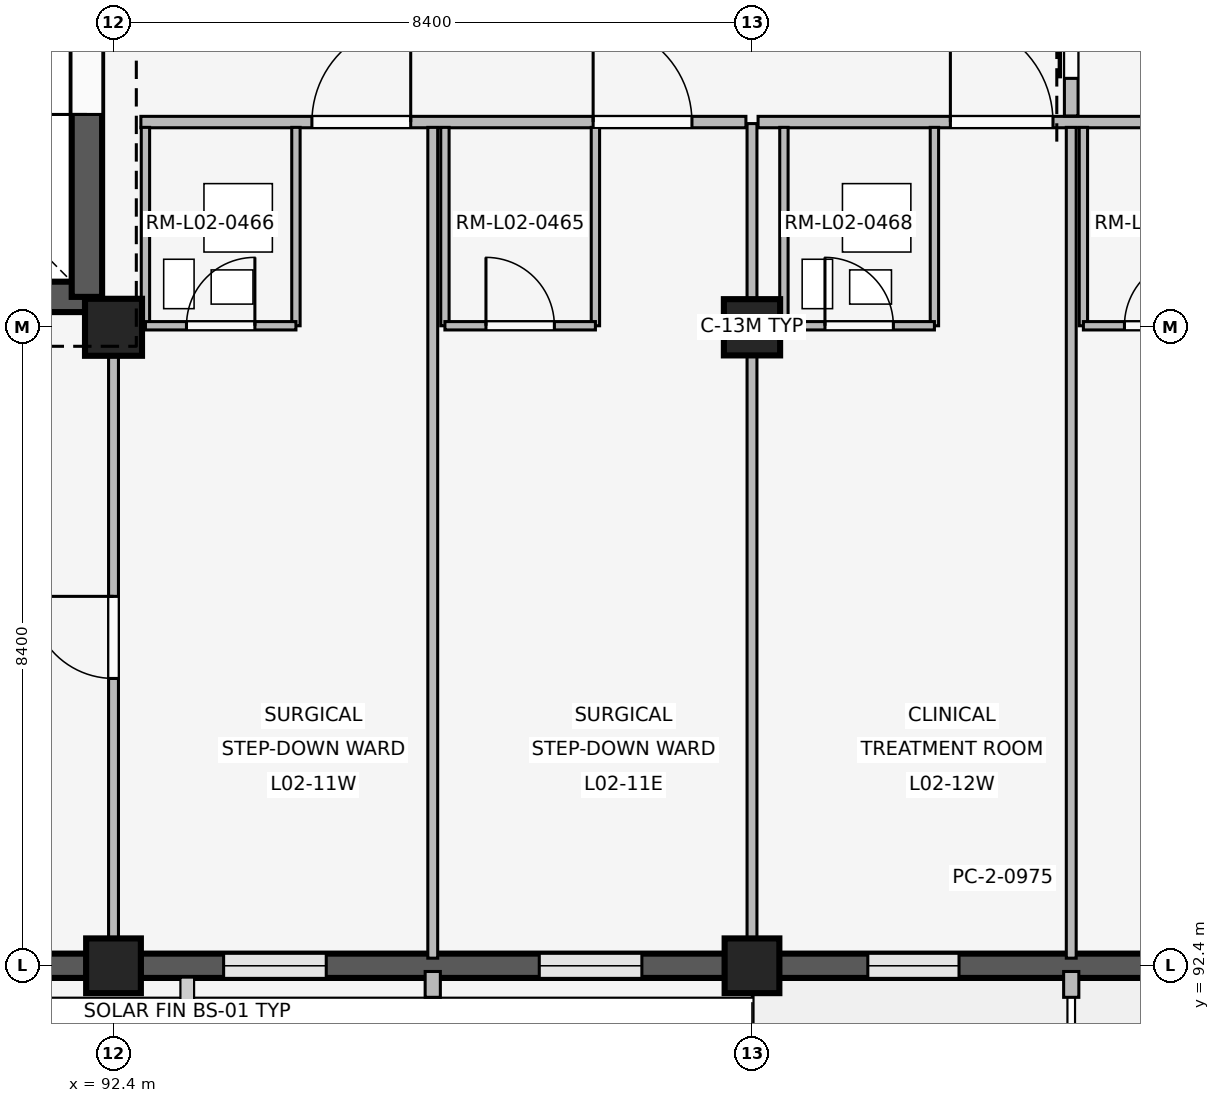
"""IFC4 building model, lengths in metres.
Left out: names, types, materials, properties, quantities, classifications, styles, units other than length and angle.
Written with IfcOpenShell. Run it as: python <this file> out.ifc"""

import sys

from ifc_helpers import new_model, si_unit, direction, frame, frame_2d, origin, origin_2d, place, context, subcontext, project, spatial, rectangle, extrude, element, fill, save


model = new_model("IFC4")
c1 = context("Model", 3, precision=1e-05, world=origin(), true_north=direction((0.0, 1.0)))
c2 = subcontext(c1, "Body", "Model", "MODEL_VIEW")
j1 = project(units=[si_unit("LENGTHUNIT", "METRE"), si_unit("PLANEANGLEUNIT", "RADIAN")], contexts=[c1])
p1 = place(None, origin())
s1 = spatial("IfcSite", under=j1, at=p1, CompositionType="ELEMENT")
p2 = place(p1, origin())
s2 = spatial("IfcBuilding", under=s1, at=p2, CompositionType="ELEMENT")
p3 = place(p2, frame((0.0, 0.0, 8.1)))
s3 = spatial("IfcBuildingStorey", under=s2, at=p3, CompositionType="ELEMENT", Elevation=8.1)
p4 = place(p3, frame((92.4, 92.4, 0.0), z_axis=(0.0, 0.0, 1.0), x_axis=(1.0, 0.0, 0.0)))
e1 = element("IfcColumn", 1, at=p4, inside=s3, PredefinedType="COLUMN", context=c2, shape_type="SweptSolid", body=[
    extrude(rectangle(XDim=0.72, YDim=0.72, at=origin_2d()), origin(), (0.0, 0.0, 1.0), 4.8),
])
p5 = place(p3, frame((92.4, 100.8, 0.0), z_axis=(0.0, 0.0, 1.0), x_axis=(1.0, 0.0, 0.0)))
e2 = element("IfcColumn", 2, at=p5, inside=s3, PredefinedType="COLUMN", context=c2, shape_type="SweptSolid", body=[
    extrude(rectangle(XDim=0.75, YDim=0.75, at=origin_2d()), origin(), (0.0, 0.0, 1.0), 4.8),
])
p6 = place(p3, frame((100.8, 92.4, 0.0), z_axis=(0.0, 0.0, 1.0), x_axis=(1.0, 0.0, 0.0)))
e3 = element("IfcColumn", 3, at=p6, inside=s3, PredefinedType="COLUMN", context=c2, shape_type="SweptSolid", body=[
    extrude(rectangle(XDim=0.72, YDim=0.72, at=origin_2d()), origin(), (0.0, 0.0, 1.0), 4.8),
])
p7 = place(p3, frame((100.8, 100.8, 0.0), z_axis=(0.0, 0.0, 1.0), x_axis=(1.0, 0.0, 0.0)))
e4 = element("IfcColumn", 4, at=p7, inside=s3, PredefinedType="COLUMN", context=c2, shape_type="SweptSolid", body=[
    extrude(rectangle(XDim=0.74, YDim=0.74, at=origin_2d()), origin(), (0.0, 0.0, 1.0), 4.8),
])
p8 = place(p3, frame((92.045, 92.4, 0.0), z_axis=(0.0, 0.0, 1.0), x_axis=(-1.0, 0.0, 0.0)))
e5 = element("IfcWall", 5, at=p8, inside=s3, PredefinedType="SOLIDWALL", context=c2, shape_type="SweptSolid", body=[
    extrude(rectangle(XDim=7.69, YDim=0.32, at=frame_2d((3.845, 0.0))), origin(), (0.0, 0.0, 1.0), 3.86),
])
p9 = place(p8, frame((1.009, 0.0, 0.85)))
e6 = element("IfcOpeningElement", 6, at=p9, cuts=e5, PredefinedType="OPENING", context=c2, shape_type="SweptSolid", body=[
    extrude(rectangle(XDim=1.52, YDim=1.65, at=frame_2d((0.76, 0.825))), frame((0.0, 0.17, 0.0), z_axis=(0.0, -1.0, 0.0), x_axis=(1.0, 0.0, 0.0)), (0.0, 0.0, 1.0), 0.34),
])
p10 = place(p8, frame((5.161, 0.0, 0.85)))
e7 = element("IfcOpeningElement", 7, at=p10, cuts=e5, PredefinedType="OPENING", context=c2, shape_type="SweptSolid", body=[
    extrude(rectangle(XDim=1.52, YDim=1.65, at=frame_2d((0.76, 0.825))), frame((0.0, 0.17, 0.0), z_axis=(0.0, -1.0, 0.0), x_axis=(1.0, 0.0, 0.0)), (0.0, 0.0, 1.0), 0.34),
])
p11 = place(p3, frame((100.445, 92.4, 0.0), z_axis=(0.0, 0.0, 1.0), x_axis=(-1.0, 0.0, 0.0)))
e8 = element("IfcWall", 8, at=p11, inside=s3, PredefinedType="SOLIDWALL", context=c2, shape_type="SweptSolid", body=[
    extrude(rectangle(XDim=7.69, YDim=0.32, at=frame_2d((3.845, 0.0))), origin(), (0.0, 0.0, 1.0), 3.86),
])
p12 = place(p11, frame((1.094, 0.0, 0.85)))
e9 = element("IfcOpeningElement", 9, at=p12, cuts=e8, PredefinedType="OPENING", context=c2, shape_type="SweptSolid", body=[
    extrude(rectangle(XDim=1.35, YDim=1.55, at=frame_2d((0.675, 0.775))), frame((0.0, 0.17, 0.0), z_axis=(0.0, -1.0, 0.0), x_axis=(1.0, 0.0, 0.0)), (0.0, 0.0, 1.0), 0.34),
])
p13 = place(p11, frame((5.246, 0.0, 0.85)))
e10 = element("IfcOpeningElement", 10, at=p13, cuts=e8, PredefinedType="OPENING", context=c2, shape_type="SweptSolid", body=[
    extrude(rectangle(XDim=1.35, YDim=1.55, at=frame_2d((0.675, 0.775))), frame((0.0, 0.17, 0.0), z_axis=(0.0, -1.0, 0.0), x_axis=(1.0, 0.0, 0.0)), (0.0, 0.0, 1.0), 0.34),
])
p14 = place(p3, frame((96.6, 92.325, 0.0), z_axis=(0.0, 0.0, 1.0), x_axis=(0.0, -1.0, 0.0)))
e11 = element("IfcWall", 11, at=p14, inside=s3, PredefinedType="ELEMENTEDWALL", context=c2, shape_type="SweptSolid", body=[
    extrude(rectangle(XDim=0.34, YDim=0.2, at=frame_2d((0.17, 0.0))), origin(), (0.0, 0.0, 1.0), 3.84),
])
p15 = place(p3, frame((108.845, 92.4, 0.0), z_axis=(0.0, 0.0, 1.0), x_axis=(-1.0, 0.0, 0.0)))
e12 = element("IfcWall", 12, at=p15, inside=s3, PredefinedType="SOLIDWALL", context=c2, shape_type="SweptSolid", body=[
    extrude(rectangle(XDim=7.69, YDim=0.32, at=frame_2d((3.845, 0.0))), origin(), (0.0, 0.0, 1.0), 3.86),
])
p16 = place(p15, frame((1.169, 0.0, 0.85)))
e13 = element("IfcOpeningElement", 13, at=p16, cuts=e12, PredefinedType="OPENING", context=c2, shape_type="SweptSolid", body=[
    extrude(rectangle(XDim=1.2, YDim=1.55, at=frame_2d((0.6, 0.775))), frame((0.0, 0.17, 0.0), z_axis=(0.0, -1.0, 0.0), x_axis=(1.0, 0.0, 0.0)), (0.0, 0.0, 1.0), 0.34),
])
p17 = place(p15, frame((5.321, 0.0, 0.85)))
e14 = element("IfcOpeningElement", 14, at=p17, cuts=e12, PredefinedType="OPENING", context=c2, shape_type="SweptSolid", body=[
    extrude(rectangle(XDim=1.2, YDim=1.55, at=frame_2d((0.6, 0.775))), frame((0.0, 0.17, 0.0), z_axis=(0.0, -1.0, 0.0), x_axis=(1.0, 0.0, 0.0)), (0.0, 0.0, 1.0), 0.34),
])
p18 = place(p3, frame((105.0, 92.325, 0.0), z_axis=(0.0, 0.0, 1.0), x_axis=(0.0, -1.0, 0.0)))
e15 = element("IfcWall", 15, at=p18, inside=s3, PredefinedType="ELEMENTEDWALL", context=c2, shape_type="SweptSolid", body=[
    extrude(rectangle(XDim=0.34, YDim=0.2, at=frame_2d((0.17, 0.0))), origin(), (0.0, 0.0, 1.0), 3.84),
])
p19 = place(p3, frame((84.55, 101.2, 0.0), z_axis=(0.0, 0.0, 1.0), x_axis=(1.0, 0.0, 0.0)))
e16 = element("IfcWall", 16, at=p19, inside=s3, PredefinedType="SHEAR", context=c2, shape_type="SweptSolid", body=[
    extrude(rectangle(XDim=7.5, YDim=0.4, at=frame_2d((3.75, 0.0))), origin(), (0.0, 0.0, 1.0), 4.52),
])
p20 = place(p19, frame((4.85, 0.0, 0.0)))
e17 = element("IfcOpeningElement", 17, at=p20, cuts=e16, PredefinedType="OPENING", context=c2, shape_type="SweptSolid", body=[
    extrude(rectangle(XDim=1.2, YDim=2.2, at=frame_2d((0.6, 1.1))), frame((0.0, 0.21, 0.0), z_axis=(0.0, -1.0, 0.0), x_axis=(1.0, 0.0, 0.0)), (0.0, 0.0, 1.0), 0.42),
])
p21 = place(p3, frame((92.05, 101.2, 0.0), z_axis=(0.0, 0.0, 1.0), x_axis=(0.0, 1.0, 0.0)))
e18 = element("IfcWall", 18, at=p21, inside=s3, PredefinedType="SHEAR", context=c2, shape_type="SweptSolid", body=[
    extrude(rectangle(XDim=7.55, YDim=0.4, at=frame_2d((3.775, 0.0))), origin(), (0.0, 0.0, 1.0), 4.52),
])
p22 = place(p21, frame((2.4, 0.0, 0.0)))
e19 = element("IfcOpeningElement", 19, at=p22, cuts=e18, PredefinedType="OPENING", context=c2, shape_type="SweptSolid", body=[
    extrude(rectangle(XDim=1.2, YDim=2.2, at=frame_2d((0.6, 1.1))), frame((0.0, 0.21, 0.0), z_axis=(0.0, -1.0, 0.0), x_axis=(1.0, 0.0, 0.0)), (0.0, 0.0, 1.0), 0.42),
])
p23 = place(p3, frame((92.4, 92.54, 0.0), z_axis=(0.0, 0.0, 1.0), x_axis=(0.0, 1.0, 0.0)))
e20 = element("IfcWall", 20, at=p23, inside=s3, PredefinedType="PARTITIONING", context=c2, shape_type="SweptSolid", body=[
    extrude(rectangle(XDim=8.21, YDim=0.13, at=frame_2d((4.105, 0.0))), origin(), (0.0, 0.0, 1.0), 3.84),
])
p24 = place(p23, frame((3.64, 0.0, 0.0)))
e21 = element("IfcOpeningElement", 21, at=p24, cuts=e20, PredefinedType="OPENING", context=c2, shape_type="SweptSolid", body=[
    extrude(rectangle(XDim=1.08, YDim=2.15, at=frame_2d((0.54, 1.075))), frame((0.0, 0.075, 0.0), z_axis=(0.0, -1.0, 0.0), x_axis=(1.0, 0.0, 0.0)), (0.0, 0.0, 1.0), 0.15),
])
p25 = place(p3, frame((92.76, 103.5, 0.0), z_axis=(0.0, 0.0, 1.0), x_axis=(1.0, 0.0, 0.0)))
e22 = element("IfcWall", 22, at=p25, inside=s3, PredefinedType="PARTITIONING", context=c2, shape_type="SweptSolid", body=[
    extrude(rectangle(XDim=7.96, YDim=0.15, at=frame_2d((3.98, 0.0))), origin(), (0.0, 0.0, 1.0), 3.84),
])
p26 = place(p25, frame((2.25, 0.0, 0.0)))
e23 = element("IfcOpeningElement", 23, at=p26, cuts=e22, PredefinedType="OPENING", context=c2, shape_type="SweptSolid", body=[
    extrude(rectangle(XDim=1.3, YDim=2.25, at=frame_2d((0.65, 1.125))), frame((0.0, 0.085, 0.0), z_axis=(0.0, -1.0, 0.0), x_axis=(1.0, 0.0, 0.0)), (0.0, 0.0, 1.0), 0.17),
])
p27 = place(p25, frame((5.95, 0.0, 0.0)))
e24 = element("IfcOpeningElement", 24, at=p27, cuts=e22, PredefinedType="OPENING", context=c2, shape_type="SweptSolid", body=[
    extrude(rectangle(XDim=1.3, YDim=2.25, at=frame_2d((0.65, 1.125))), frame((0.0, 0.085, 0.0), z_axis=(0.0, -1.0, 0.0), x_axis=(1.0, 0.0, 0.0)), (0.0, 0.0, 1.0), 0.17),
])
p28 = place(p3, frame((96.6, 92.5, 0.0), z_axis=(0.0, 0.0, 1.0), x_axis=(0.0, 1.0, 0.0)))
e25 = element("IfcWall", 25, at=p28, inside=s3, PredefinedType="PARTITIONING", context=c2, shape_type="SweptSolid", body=[
    extrude(rectangle(XDim=10.93, YDim=0.13, at=frame_2d((5.465, 0.0))), origin(), (0.0, 0.0, 1.0), 3.84),
])
for number, where, z_axis, x_axis in (
    (26, (92.82, 100.82, 0.0), (0.0, 0.0, 1.0), (0.0, 1.0, 0.0)),
    (27, (94.8, 100.82, 0.0), (0.0, 0.0, 1.0), (0.0, 1.0, 0.0)),
):
    element("IfcWall", number, at=place(p3, frame(where, z_axis=z_axis, x_axis=x_axis)), inside=s3, PredefinedType="PARTITIONING", context=c2, shape_type="SweptSolid", body=[
        extrude(rectangle(XDim=2.61, YDim=0.11, at=frame_2d((1.305, 0.0))), origin(), (0.0, 0.0, 1.0), 3.84),
    ])
p29 = place(p3, frame((92.82, 100.82, 0.0), z_axis=(0.0, 0.0, 1.0), x_axis=(1.0, 0.0, 0.0)))
e28 = element("IfcWall", 28, at=p29, inside=s3, PredefinedType="PARTITIONING", context=c2, shape_type="SweptSolid", body=[
    extrude(rectangle(XDim=1.98, YDim=0.11, at=frame_2d((0.99, 0.0))), origin(), (0.0, 0.0, 1.0), 3.84),
])
p30 = place(p29, frame((0.54, 0.0, 0.0)))
e29 = element("IfcOpeningElement", 29, at=p30, cuts=e28, PredefinedType="OPENING", context=c2, shape_type="SweptSolid", body=[
    extrude(rectangle(XDim=0.9, YDim=2.1, at=frame_2d((0.45, 1.05))), frame((0.0, 0.065, 0.0), z_axis=(0.0, -1.0, 0.0), x_axis=(1.0, 0.0, 0.0)), (0.0, 0.0, 1.0), 0.13),
])
for number, where, z_axis, x_axis in (
    (30, (96.76, 100.82, 0.0), (0.0, 0.0, 1.0), (0.0, 1.0, 0.0)),
    (31, (98.74, 100.82, 0.0), (0.0, 0.0, 1.0), (0.0, 1.0, 0.0)),
):
    element("IfcWall", number, at=place(p3, frame(where, z_axis=z_axis, x_axis=x_axis)), inside=s3, PredefinedType="PARTITIONING", context=c2, shape_type="SweptSolid", body=[
        extrude(rectangle(XDim=2.61, YDim=0.11, at=frame_2d((1.305, 0.0))), origin(), (0.0, 0.0, 1.0), 3.84),
    ])
p31 = place(p3, frame((96.76, 100.82, 0.0), z_axis=(0.0, 0.0, 1.0), x_axis=(1.0, 0.0, 0.0)))
e32 = element("IfcWall", 32, at=p31, inside=s3, PredefinedType="PARTITIONING", context=c2, shape_type="SweptSolid", body=[
    extrude(rectangle(XDim=1.98, YDim=0.11, at=frame_2d((0.99, 0.0))), origin(), (0.0, 0.0, 1.0), 3.84),
])
p32 = place(p31, frame((0.54, 0.0, 0.0)))
e33 = element("IfcOpeningElement", 33, at=p32, cuts=e32, PredefinedType="OPENING", context=c2, shape_type="SweptSolid", body=[
    extrude(rectangle(XDim=0.9, YDim=2.1, at=frame_2d((0.45, 1.05))), frame((0.0, 0.065, 0.0), z_axis=(0.0, -1.0, 0.0), x_axis=(1.0, 0.0, 0.0)), (0.0, 0.0, 1.0), 0.13),
])
p33 = place(p3, frame((100.8, 92.54, 0.0), z_axis=(0.0, 0.0, 1.0), x_axis=(0.0, 1.0, 0.0)))
e34 = element("IfcWall", 34, at=p33, inside=s3, PredefinedType="PARTITIONING", context=c2, shape_type="SweptSolid", body=[
    extrude(rectangle(XDim=10.94, YDim=0.13, at=frame_2d((5.47, 0.0))), origin(), (0.0, 0.0, 1.0), 3.84),
])
p34 = place(p3, frame((100.88, 103.5, 0.0), z_axis=(0.0, 0.0, 1.0), x_axis=(1.0, 0.0, 0.0)))
e35 = element("IfcWall", 35, at=p34, inside=s3, PredefinedType="PARTITIONING", context=c2, shape_type="SweptSolid", body=[
    extrude(rectangle(XDim=8.24, YDim=0.15, at=frame_2d((4.12, 0.0))), origin(), (0.0, 0.0, 1.0), 3.84),
])
p35 = place(p34, frame((2.53, 0.0, 0.0)))
e36 = element("IfcOpeningElement", 36, at=p35, cuts=e35, PredefinedType="OPENING", context=c2, shape_type="SweptSolid", body=[
    extrude(rectangle(XDim=1.35, YDim=2.25, at=frame_2d((0.675, 1.125))), frame((0.0, 0.085, 0.0), z_axis=(0.0, -1.0, 0.0), x_axis=(1.0, 0.0, 0.0)), (0.0, 0.0, 1.0), 0.17),
])
p36 = place(p34, frame((6.23, 0.0, 0.0)))
e37 = element("IfcOpeningElement", 37, at=p36, cuts=e35, PredefinedType="OPENING", context=c2, shape_type="SweptSolid", body=[
    extrude(rectangle(XDim=1.35, YDim=2.25, at=frame_2d((0.675, 1.125))), frame((0.0, 0.085, 0.0), z_axis=(0.0, -1.0, 0.0), x_axis=(1.0, 0.0, 0.0)), (0.0, 0.0, 1.0), 0.17),
])
p37 = place(p3, frame((105.0, 92.5, 0.0), z_axis=(0.0, 0.0, 1.0), x_axis=(0.0, 1.0, 0.0)))
e38 = element("IfcWall", 38, at=p37, inside=s3, PredefinedType="PARTITIONING", context=c2, shape_type="SweptSolid", body=[
    extrude(rectangle(XDim=10.93, YDim=0.13, at=frame_2d((5.465, 0.0))), origin(), (0.0, 0.0, 1.0), 3.84),
])
for number, where, z_axis, x_axis in (
    (39, (101.22, 100.82, 0.0), (0.0, 0.0, 1.0), (0.0, 1.0, 0.0)),
    (40, (103.2, 100.82, 0.0), (0.0, 0.0, 1.0), (0.0, 1.0, 0.0)),
):
    element("IfcWall", number, at=place(p3, frame(where, z_axis=z_axis, x_axis=x_axis)), inside=s3, PredefinedType="PARTITIONING", context=c2, shape_type="SweptSolid", body=[
        extrude(rectangle(XDim=2.61, YDim=0.11, at=frame_2d((1.305, 0.0))), origin(), (0.0, 0.0, 1.0), 3.84),
    ])
p38 = place(p3, frame((101.22, 100.82, 0.0), z_axis=(0.0, 0.0, 1.0), x_axis=(1.0, 0.0, 0.0)))
e41 = element("IfcWall", 41, at=p38, inside=s3, PredefinedType="PARTITIONING", context=c2, shape_type="SweptSolid", body=[
    extrude(rectangle(XDim=1.98, YDim=0.11, at=frame_2d((0.99, 0.0))), origin(), (0.0, 0.0, 1.0), 3.84),
])
p39 = place(p38, frame((0.54, 0.0, 0.0)))
e42 = element("IfcOpeningElement", 42, at=p39, cuts=e41, PredefinedType="OPENING", context=c2, shape_type="SweptSolid", body=[
    extrude(rectangle(XDim=0.9, YDim=2.1, at=frame_2d((0.45, 1.05))), frame((0.0, 0.065, 0.0), z_axis=(0.0, -1.0, 0.0), x_axis=(1.0, 0.0, 0.0)), (0.0, 0.0, 1.0), 0.13),
])
p40 = place(p3, frame((105.16, 100.82, 0.0), z_axis=(0.0, 0.0, 1.0), x_axis=(0.0, 1.0, 0.0)))
e43 = element("IfcWall", 43, at=p40, inside=s3, PredefinedType="PARTITIONING", context=c2, shape_type="SweptSolid", body=[
    extrude(rectangle(XDim=2.61, YDim=0.11, at=frame_2d((1.305, 0.0))), origin(), (0.0, 0.0, 1.0), 3.84),
])
p41 = place(p3, frame((105.16, 100.82, 0.0), z_axis=(0.0, 0.0, 1.0), x_axis=(1.0, 0.0, 0.0)))
e44 = element("IfcWall", 44, at=p41, inside=s3, PredefinedType="PARTITIONING", context=c2, shape_type="SweptSolid", body=[
    extrude(rectangle(XDim=1.98, YDim=0.11, at=frame_2d((0.99, 0.0))), origin(), (0.0, 0.0, 1.0), 3.84),
])
p42 = place(p41, frame((0.54, 0.0, 0.0)))
e45 = element("IfcOpeningElement", 45, at=p42, cuts=e44, PredefinedType="OPENING", context=c2, shape_type="SweptSolid", body=[
    extrude(rectangle(XDim=0.9, YDim=2.1, at=frame_2d((0.45, 1.05))), frame((0.0, 0.065, 0.0), z_axis=(0.0, -1.0, 0.0), x_axis=(1.0, 0.0, 0.0)), (0.0, 0.0, 1.0), 0.13),
])
p43 = place(p3, frame((103.65, 93.55, 0.0), z_axis=(0.0, 0.0, 1.0), x_axis=(1.0, 0.0, 0.0)))
e46 = element("IfcWall", 46, at=p43, inside=s3, PredefinedType="PLUMBINGWALL", context=c2, shape_type="SweptSolid", body=[
    extrude(rectangle(XDim=0.9, YDim=0.24, at=frame_2d((0.45, 0.0))), origin(), (0.0, 0.0, 1.0), 3.84),
])
p44 = place(p3, frame((105.0, 103.58, 0.0), z_axis=(0.0, 0.0, 1.0), x_axis=(0.0, 1.0, 0.0)))
e47 = element("IfcWall", 47, at=p44, inside=s3, PredefinedType="PARTITIONING", context=c2, shape_type="SweptSolid", body=[
    extrude(rectangle(XDim=2.84, YDim=0.18, at=frame_2d((1.42, 0.0))), origin(), (0.0, 0.0, 1.0), 3.84),
])
p45 = place(p44, frame((0.495, 0.0, 0.0)))
e48 = element("IfcOpeningElement", 48, at=p45, cuts=e47, PredefinedType="OPENING", context=c2, shape_type="SweptSolid", body=[
    extrude(rectangle(XDim=1.85, YDim=2.3, at=frame_2d((0.925, 1.15))), frame((0.0, 0.1, 0.0), z_axis=(0.0, -1.0, 0.0), x_axis=(1.0, 0.0, 0.0)), (0.0, 0.0, 1.0), 0.2),
])
p46 = place(p12, origin())
e49 = element("IfcWindow", 49, at=p46, inside=s3, PartitioningType="SINGLE_PANEL", PredefinedType="WINDOW", context=c2, shape_type="SweptSolid", body=[
    extrude(rectangle(XDim=1.35, YDim=1.55, at=frame_2d((0.675, 0.775))), frame((0.0, 0.03, 0.0), z_axis=(0.0, -1.0, 0.0), x_axis=(1.0, 0.0, 0.0)), (0.0, 0.0, 1.0), 0.06),
])
fill(e9, e49)
p47 = place(p13, origin())
e50 = element("IfcWindow", 50, at=p47, inside=s3, PartitioningType="SINGLE_PANEL", PredefinedType="WINDOW", context=c2, shape_type="SweptSolid", body=[
    extrude(rectangle(XDim=1.35, YDim=1.55, at=frame_2d((0.675, 0.775))), frame((0.0, 0.03, 0.0), z_axis=(0.0, -1.0, 0.0), x_axis=(1.0, 0.0, 0.0)), (0.0, 0.0, 1.0), 0.06),
])
fill(e10, e50)
p48 = place(p17, origin())
e51 = element("IfcWindow", 51, at=p48, inside=s3, PartitioningType="SINGLE_PANEL", PredefinedType="WINDOW", context=c2, shape_type="SweptSolid", body=[
    extrude(rectangle(XDim=1.2, YDim=1.55, at=frame_2d((0.6, 0.775))), frame((0.0, 0.03, 0.0), z_axis=(0.0, -1.0, 0.0), x_axis=(1.0, 0.0, 0.0)), (0.0, 0.0, 1.0), 0.06),
])
fill(e14, e51)
p49 = place(p22, origin())
e52 = element("IfcDoor", 52, at=p49, inside=s3, OperationType="SINGLE_SWING_LEFT", PredefinedType="DOOR", context=c2, shape_type="SweptSolid", body=[
    extrude(rectangle(XDim=1.2, YDim=2.2, at=frame_2d((0.6, 1.1))), frame((0.0, 0.025, 0.0), z_axis=(0.0, -1.0, 0.0), x_axis=(1.0, 0.0, 0.0)), (0.0, 0.0, 1.0), 0.05),
])
fill(e19, e52)
p50 = place(p24, origin())
e53 = element("IfcDoor", 53, at=p50, inside=s3, OperationType="SINGLE_SWING_RIGHT", PredefinedType="DOOR", context=c2, shape_type="SweptSolid", body=[
    extrude(rectangle(XDim=1.08, YDim=2.15, at=frame_2d((0.54, 1.075))), frame((0.0, 0.025, 0.0), z_axis=(0.0, -1.0, 0.0), x_axis=(1.0, 0.0, 0.0)), (0.0, 0.0, 1.0), 0.05),
])
fill(e21, e53)
p51 = place(p26, origin())
e54 = element("IfcDoor", 54, at=p51, inside=s3, OperationType="SINGLE_SWING_RIGHT", PredefinedType="DOOR", context=c2, shape_type="SweptSolid", body=[
    extrude(rectangle(XDim=1.3, YDim=2.25, at=frame_2d((0.65, 1.125))), frame((0.0, 0.025, 0.0), z_axis=(0.0, -1.0, 0.0), x_axis=(1.0, 0.0, 0.0)), (0.0, 0.0, 1.0), 0.05),
])
fill(e23, e54)
p52 = place(p27, origin())
e55 = element("IfcDoor", 55, at=p52, inside=s3, OperationType="SINGLE_SWING_LEFT", PredefinedType="DOOR", context=c2, shape_type="SweptSolid", body=[
    extrude(rectangle(XDim=1.3, YDim=2.25, at=frame_2d((0.65, 1.125))), frame((0.0, 0.025, 0.0), z_axis=(0.0, -1.0, 0.0), x_axis=(1.0, 0.0, 0.0)), (0.0, 0.0, 1.0), 0.05),
])
fill(e24, e55)
p53 = place(p30, origin())
e56 = element("IfcDoor", 56, at=p53, inside=s3, OperationType="SINGLE_SWING_RIGHT", PredefinedType="DOOR", context=c2, shape_type="SweptSolid", body=[
    extrude(rectangle(XDim=0.9, YDim=2.1, at=frame_2d((0.45, 1.05))), frame((0.0, 0.025, 0.0), z_axis=(0.0, -1.0, 0.0), x_axis=(1.0, 0.0, 0.0)), (0.0, 0.0, 1.0), 0.05),
])
fill(e29, e56)
p54 = place(p32, origin())
e57 = element("IfcDoor", 57, at=p54, inside=s3, OperationType="SINGLE_SWING_LEFT", PredefinedType="DOOR", context=c2, shape_type="SweptSolid", body=[
    extrude(rectangle(XDim=0.9, YDim=2.1, at=frame_2d((0.45, 1.05))), frame((0.0, 0.025, 0.0), z_axis=(0.0, -1.0, 0.0), x_axis=(1.0, 0.0, 0.0)), (0.0, 0.0, 1.0), 0.05),
])
fill(e33, e57)
p55 = place(p35, origin())
e58 = element("IfcDoor", 58, at=p55, inside=s3, OperationType="SINGLE_SWING_LEFT", PredefinedType="DOOR", context=c2, shape_type="SweptSolid", body=[
    extrude(rectangle(XDim=1.35, YDim=2.25, at=frame_2d((0.675, 1.125))), frame((0.0, 0.025, 0.0), z_axis=(0.0, -1.0, 0.0), x_axis=(1.0, 0.0, 0.0)), (0.0, 0.0, 1.0), 0.05),
])
fill(e36, e58)
p56 = place(p39, origin())
e59 = element("IfcDoor", 59, at=p56, inside=s3, OperationType="SINGLE_SWING_LEFT", PredefinedType="DOOR", context=c2, shape_type="SweptSolid", body=[
    extrude(rectangle(XDim=0.9, YDim=2.1, at=frame_2d((0.45, 1.05))), frame((0.0, 0.025, 0.0), z_axis=(0.0, -1.0, 0.0), x_axis=(1.0, 0.0, 0.0)), (0.0, 0.0, 1.0), 0.05),
])
fill(e42, e59)
p57 = place(p42, origin())
e60 = element("IfcDoor", 60, at=p57, inside=s3, OperationType="SINGLE_SWING_RIGHT", PredefinedType="DOOR", context=c2, shape_type="SweptSolid", body=[
    extrude(rectangle(XDim=0.9, YDim=2.1, at=frame_2d((0.45, 1.05))), frame((0.0, 0.025, 0.0), z_axis=(0.0, -1.0, 0.0), x_axis=(1.0, 0.0, 0.0)), (0.0, 0.0, 1.0), 0.05),
])
fill(e45, e60)
p58 = place(p45, origin())
e61 = element("IfcDoor", 61, at=p58, inside=s3, OperationType="SLIDING_TO_LEFT", PredefinedType="DOOR", context=c2, shape_type="SweptSolid", body=[
    extrude(rectangle(XDim=1.85, YDim=2.3, at=frame_2d((0.925, 1.15))), frame((0.0, 0.025, 0.0), z_axis=(0.0, -1.0, 0.0), x_axis=(1.0, 0.0, 0.0)), (0.0, 0.0, 1.0), 0.05),
])
fill(e48, e61)
save(model, sys.argv[1])
